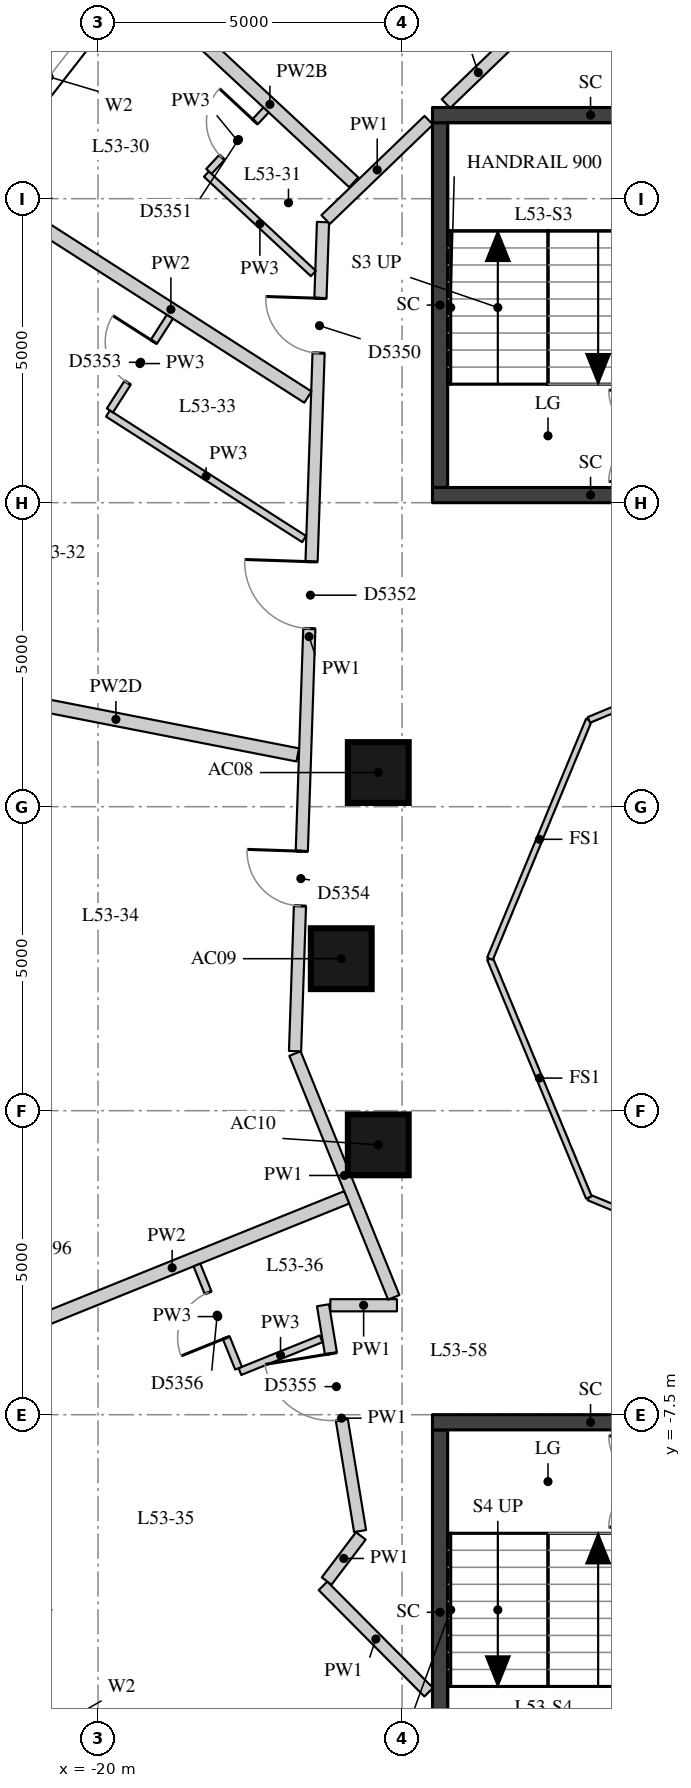
"""IFC4 building model, lengths in metres.
Left out: names, types, materials, properties, quantities, classifications, styles, units other than length and angle.
Written with IfcOpenShell. Run it as: python <this file> out.ifc"""

import sys

from ifc_helpers import new_model, si_unit, direction, frame, frame_2d, origin, origin_2d, place, context, subcontext, project, spatial, rectangle, extrude, element, fill, save


model = new_model("IFC4")
c1 = context("Model", 3, precision=1e-05, world=origin(), true_north=direction((0.0, 1.0)))
c2 = subcontext(c1, "Body", "Model", "MODEL_VIEW")
j1 = project(units=[si_unit("LENGTHUNIT", "METRE"), si_unit("PLANEANGLEUNIT", "RADIAN")], contexts=[c1])
p1 = place(None, origin())
s1 = spatial("IfcSite", under=j1, at=p1, CompositionType="ELEMENT")
p2 = place(p1, origin())
s2 = spatial("IfcBuilding", under=s1, at=p2, CompositionType="ELEMENT")
p3 = place(p2, frame((0.0, 0.0, 189.2)))
s3 = spatial("IfcBuildingStorey", under=s2, at=p3, CompositionType="ELEMENT", Elevation=189.2)
for number, where, z_axis, x_axis in (
    (1, (-15.391, 3.062, 0.0), (0.0, 0.0, 1.0), (1.0, 0.0, 0.0)),
    (2, (-16.0, 0.0, 0.0), (0.0, 0.0, 1.0), (1.0, 0.0, 0.0)),
    (3, (-15.391, -3.062, 0.0), (0.0, 0.0, 1.0), (1.0, 0.0, 0.0)),
):
    element("IfcColumn", number, at=place(p3, frame(where, z_axis=z_axis, x_axis=x_axis)), inside=s3, PredefinedType="COLUMN", context=c2, shape_type="SweptSolid", body=[
        extrude(rectangle(XDim=1.0, YDim=1.0, at=origin_2d()), origin(), (0.0, 0.0, 1.0), 3.3),
    ])
p4 = place(p3, frame((-19.751, 15.861, 0.0), z_axis=(0.0, 0.0, 1.0), x_axis=(-0.614220816451, -0.789134201919, 0.0)))
e4 = element("IfcWall", 4, at=p4, inside=s3, PredefinedType="SOLIDWALL", context=c2, shape_type="SweptSolid", body=[
    extrude(rectangle(XDim=3.438, YDim=0.45, at=frame_2d((1.719, 0.0))), origin(), (0.0, 0.0, 1.0), 3.02),
])
p5 = place(p4, frame((0.719, 0.0, 0.4)))
e5 = element("IfcOpeningElement", 5, at=p5, cuts=e4, PredefinedType="OPENING", context=c2, shape_type="SweptSolid", body=[
    extrude(rectangle(XDim=2.0, YDim=1.75, at=frame_2d((1.0, 0.875))), frame((0.0, 0.235, 0.0), z_axis=(0.0, -1.0, 0.0), x_axis=(1.0, 0.0, 0.0)), (0.0, 0.0, 1.0), 0.47),
])
p6 = place(p3, frame((-21.863, -11.348, 0.0), z_axis=(0.0, 0.0, 1.0), x_axis=(0.614255239631, -0.789107407509, 0.0)))
e6 = element("IfcWall", 6, at=p6, inside=s3, PredefinedType="SOLIDWALL", context=c2, shape_type="SweptSolid", body=[
    extrude(rectangle(XDim=3.438, YDim=0.45, at=frame_2d((1.719, 0.0))), origin(), (0.0, 0.0, 1.0), 3.02),
])
p7 = place(p6, frame((0.719, 0.0, 0.4)))
e7 = element("IfcOpeningElement", 7, at=p7, cuts=e6, PredefinedType="OPENING", context=c2, shape_type="SweptSolid", body=[
    extrude(rectangle(XDim=2.0, YDim=1.75, at=frame_2d((1.0, 0.875))), frame((0.0, 0.235, 0.0), z_axis=(0.0, -1.0, 0.0), x_axis=(1.0, 0.0, 0.0)), (0.0, 0.0, 1.0), 0.47),
])
p8 = place(p3, frame((-14.375, 7.75, -0.28), z_axis=(0.0, 0.0, 1.0), x_axis=(0.0, 1.0, 0.0)))
e8 = element("IfcWall", 8, at=p8, inside=s3, PredefinedType="SHEAR", context=c2, shape_type="SweptSolid", body=[
    extrude(rectangle(XDim=6.0, YDim=0.25, at=frame_2d((3.0, 0.0))), origin(), (0.0, 0.0, 1.0), 3.3),
])
for number, where, z_axis, x_axis in (
    (9, (-14.5, 13.875, -0.28), (0.0, 0.0, 1.0), (1.0, 0.0, 0.0)),
    (10, (-14.5, 7.625, -0.28), (0.0, 0.0, 1.0), (1.0, 0.0, 0.0)),
):
    element("IfcWall", number, at=place(p3, frame(where, z_axis=z_axis, x_axis=x_axis)), inside=s3, PredefinedType="SHEAR", context=c2, shape_type="SweptSolid", body=[
        extrude(rectangle(XDim=5.2, YDim=0.25, at=frame_2d((2.6, 0.0))), origin(), (0.0, 0.0, 1.0), 3.3),
    ])
p9 = place(p3, frame((-14.375, -13.75, -0.28), z_axis=(0.0, 0.0, 1.0), x_axis=(0.0, 1.0, 0.0)))
e11 = element("IfcWall", 11, at=p9, inside=s3, PredefinedType="SHEAR", context=c2, shape_type="SweptSolid", body=[
    extrude(rectangle(XDim=6.0, YDim=0.25, at=frame_2d((3.0, 0.0))), origin(), (0.0, 0.0, 1.0), 3.3),
])
p10 = place(p3, frame((-14.5, -7.625, -0.28), z_axis=(0.0, 0.0, 1.0), x_axis=(1.0, 0.0, 0.0)))
e12 = element("IfcWall", 12, at=p10, inside=s3, PredefinedType="SHEAR", context=c2, shape_type="SweptSolid", body=[
    extrude(rectangle(XDim=5.2, YDim=0.25, at=frame_2d((2.6, 0.0))), origin(), (0.0, 0.0, 1.0), 3.3),
])
p11 = place(p3, frame((-14.562, -12.064, 0.0), z_axis=(0.0, 0.0, 1.0), x_axis=(-0.704826289083, 0.709379942074, 0.0)))
e13 = element("IfcWall", 13, at=p11, inside=s3, PredefinedType="PARTITIONING", context=c2, shape_type="SweptSolid", body=[
    extrude(rectangle(XDim=2.466, YDim=0.2, at=frame_2d((1.233, 0.0))), origin(), (0.0, 0.0, 1.0), 3.02),
])
p12 = place(p3, frame((-16.24, -10.236, 0.0), z_axis=(0.0, 0.0, 1.0), x_axis=(0.60389301212, 0.797065386222, 0.0)))
e14 = element("IfcWall", 14, at=p12, inside=s3, PredefinedType="PARTITIONING", context=c2, shape_type="SweptSolid", body=[
    extrude(rectangle(XDim=0.931, YDim=0.2, at=frame_2d((0.466, 0.0))), origin(), (0.0, 0.0, 1.0), 3.02),
])
p13 = place(p3, frame((-15.69, -9.414, 0.0), z_axis=(0.0, 0.0, 1.0), x_axis=(-0.161968669214, 0.986795900981, 0.0)))
e15 = element("IfcWall", 15, at=p13, inside=s3, PredefinedType="PARTITIONING", context=c2, shape_type="SweptSolid", body=[
    extrude(rectangle(XDim=3.764, YDim=0.2, at=frame_2d((1.882, 0.0))), origin(), (0.0, 0.0, 1.0), 3.02),
])
p14 = place(p13, frame((1.858, 0.0, 0.0)))
e16 = element("IfcOpeningElement", 16, at=p14, cuts=e15, PredefinedType="OPENING", context=c2, shape_type="SweptSolid", body=[
    extrude(rectangle(XDim=1.1, YDim=2.1, at=frame_2d((0.55, 1.05))), frame((0.0, 0.11, 0.0), z_axis=(0.0, -1.0, 0.0), x_axis=(1.0, 0.0, 0.0)), (0.0, 0.0, 1.0), 0.22),
])
p15 = place(p3, frame((-16.18, -5.7, 0.0), z_axis=(0.0, 0.0, 1.0), x_axis=(1.0, 0.0, 0.0)))
e17 = element("IfcWall", 17, at=p15, inside=s3, PredefinedType="PARTITIONING", context=c2, shape_type="SweptSolid", body=[
    extrude(rectangle(XDim=1.096, YDim=0.2, at=frame_2d((0.548, 0.0))), origin(), (0.0, 0.0, 1.0), 3.02),
])
p16 = place(p3, frame((-15.137, -5.57, 0.0), z_axis=(0.0, 0.0, 1.0), x_axis=(-0.375464059939, 0.926836954213, 0.0)))
e18 = element("IfcWall", 18, at=p16, inside=s3, PredefinedType="PARTITIONING", context=c2, shape_type="SweptSolid", body=[
    extrude(rectangle(XDim=4.326, YDim=0.2, at=frame_2d((2.163, 0.0))), origin(), (0.0, 0.0, 1.0), 3.02),
])
p17 = place(p3, frame((-16.76, -1.521, 0.0), z_axis=(0.0, 0.0, 1.0), x_axis=(0.033695560079, 0.999432143385, 0.0)))
e19 = element("IfcWall", 19, at=p17, inside=s3, PredefinedType="PARTITIONING", context=c2, shape_type="SweptSolid", body=[
    extrude(rectangle(XDim=13.643, YDim=0.2, at=frame_2d((6.822, 0.0))), origin(), (0.0, 0.0, 1.0), 3.02),
])
p18 = place(p17, frame((11.489, 0.0, 0.0)))
e20 = element("IfcOpeningElement", 20, at=p18, cuts=e19, PredefinedType="OPENING", context=c2, shape_type="SweptSolid", body=[
    extrude(rectangle(XDim=0.9, YDim=2.1, at=frame_2d((0.45, 1.05))), frame((0.0, 0.11, 0.0), z_axis=(0.0, -1.0, 0.0), x_axis=(1.0, 0.0, 0.0)), (0.0, 0.0, 1.0), 0.22),
])
p19 = place(p17, frame((6.954, 0.0, 0.0)))
e21 = element("IfcOpeningElement", 21, at=p19, cuts=e19, PredefinedType="OPENING", context=c2, shape_type="SweptSolid", body=[
    extrude(rectangle(XDim=1.1, YDim=2.1, at=frame_2d((0.55, 1.05))), frame((0.0, 0.11, 0.0), z_axis=(0.0, -1.0, 0.0), x_axis=(1.0, 0.0, 0.0)), (0.0, 0.0, 1.0), 0.22),
])
p20 = place(p17, frame((2.39, 0.0, 0.0)))
e22 = element("IfcOpeningElement", 22, at=p20, cuts=e19, PredefinedType="OPENING", context=c2, shape_type="SweptSolid", body=[
    extrude(rectangle(XDim=0.9, YDim=2.1, at=frame_2d((0.45, 1.05))), frame((0.0, 0.11, 0.0), z_axis=(0.0, -1.0, 0.0), x_axis=(1.0, 0.0, 0.0)), (0.0, 0.0, 1.0), 0.22),
])
p21 = place(p3, frame((-16.257, 12.157, 0.0), z_axis=(0.0, 0.0, 1.0), x_axis=(0.720356671174, 0.693603825174, 0.0)))
e23 = element("IfcWall", 23, at=p21, inside=s3, PredefinedType="PARTITIONING", context=c2, shape_type="SweptSolid", body=[
    extrude(rectangle(XDim=2.354, YDim=0.2, at=frame_2d((1.177, 0.0))), origin(), (0.0, 0.0, 1.0), 3.02),
])
p22 = place(p3, frame((-14.278, 14.062, 0.0), z_axis=(0.0, 0.0, 1.0), x_axis=(0.720213092954, 0.693752910435, 0.0)))
e24 = element("IfcWall", 24, at=p22, inside=s3, PredefinedType="PARTITIONING", context=c2, shape_type="SweptSolid", body=[
    extrude(rectangle(XDim=1.476, YDim=0.2, at=frame_2d((0.738, 0.0))), origin(), (0.0, 0.0, 1.0), 3.02),
])
p23 = place(p3, frame((-18.553, 15.334, 0.0), z_axis=(0.0, 0.0, 1.0), x_axis=(0.732303975018, -0.680977891105, 0.0)))
e25 = element("IfcWall", 25, at=p23, inside=s3, PredefinedType="PARTITIONING", context=c2, shape_type="SweptSolid", body=[
    extrude(rectangle(XDim=3.767, YDim=0.22, at=frame_2d((1.884, 0.0))), origin(), (0.0, 0.0, 1.0), 2.57),
])
p24 = place(p3, frame((-21.055, 12.121, 0.0), z_axis=(0.0, 0.0, 1.0), x_axis=(0.842281345898, -0.539038156675, 0.0)))
e26 = element("IfcWall", 26, at=p24, inside=s3, PredefinedType="PARTITIONING", context=c2, shape_type="SweptSolid", body=[
    extrude(rectangle(XDim=5.35, YDim=0.22, at=frame_2d((2.675, 0.0))), origin(), (0.0, 0.0, 1.0), 3.02),
])
p25 = place(p3, frame((-22.697, 4.521, 0.0), z_axis=(0.0, 0.0, 1.0), x_axis=(0.981441525081, -0.19176165635, 0.0)))
e27 = element("IfcWall", 27, at=p25, inside=s3, PredefinedType="PARTITIONING", context=c2, shape_type="SweptSolid", body=[
    extrude(rectangle(XDim=6.094, YDim=0.22, at=frame_2d((3.047, 0.0))), origin(), (0.0, 0.0, 1.0), 2.47),
])
p26 = place(p3, frame((-21.651, -6.241, 0.0), z_axis=(0.0, 0.0, 1.0), x_axis=(0.927381885483, 0.374116076208, 0.0)))
e28 = element("IfcWall", 28, at=p26, inside=s3, PredefinedType="PARTITIONING", context=c2, shape_type="SweptSolid", body=[
    extrude(rectangle(XDim=6.19, YDim=0.22, at=frame_2d((3.095, 0.0))), origin(), (0.0, 0.0, 1.0), 3.02),
])
p27 = place(p3, frame((-16.459, 11.27, 0.0), z_axis=(0.0, 0.0, 1.0), x_axis=(-0.732311710068, 0.68096957296, 0.0)))
e29 = element("IfcWall", 29, at=p27, inside=s3, PredefinedType="PARTITIONING", context=c2, shape_type="SweptSolid", body=[
    extrude(rectangle(XDim=2.401, YDim=0.12, at=frame_2d((1.201, 0.0))), origin(), (0.0, 0.0, 1.0), 3.02),
])
p28 = place(p3, frame((-16.61, 6.902, 0.0), z_axis=(0.0, 0.0, 1.0), x_axis=(-0.842288763401, 0.539026566181, 0.0)))
e30 = element("IfcWall", 30, at=p28, inside=s3, PredefinedType="PARTITIONING", context=c2, shape_type="SweptSolid", body=[
    extrude(rectangle(XDim=3.83, YDim=0.12, at=frame_2d((1.915, 0.0))), origin(), (0.0, 0.0, 1.0), 3.02),
])
p29 = place(p3, frame((-16.331, -6.252, 0.0), z_axis=(0.0, 0.0, 1.0), x_axis=(-0.927409233125, -0.374048278053, 0.0)))
e31 = element("IfcWall", 31, at=p29, inside=s3, PredefinedType="PARTITIONING", context=c2, shape_type="SweptSolid", body=[
    extrude(rectangle(XDim=1.44, YDim=0.12, at=frame_2d((0.72, 0.0))), origin(), (0.0, 0.0, 1.0), 3.02),
])
p30 = place(p3, frame((-18.177, 12.949, 0.0), z_axis=(0.0, 0.0, 1.0), x_axis=(0.681081886823, 0.732207254431, 0.0)))
e32 = element("IfcWall", 32, at=p30, inside=s3, PredefinedType="PARTITIONING", context=c2, shape_type="SweptSolid", body=[
    extrude(rectangle(XDim=1.38, YDim=0.12, at=frame_2d((0.69, 0.0))), origin(), (0.0, 0.0, 1.0), 3.02),
])
p31 = place(p30, frame((0.315, 0.0, 0.0)))
e33 = element("IfcOpeningElement", 33, at=p31, cuts=e32, PredefinedType="OPENING", context=c2, shape_type="SweptSolid", body=[
    extrude(rectangle(XDim=0.8, YDim=2.1, at=frame_2d((0.4, 1.05))), frame((0.0, 0.07, 0.0), z_axis=(0.0, -1.0, 0.0), x_axis=(1.0, 0.0, 0.0)), (0.0, 0.0, 1.0), 0.14),
])
p32 = place(p3, frame((-19.804, 9.017, 0.0), z_axis=(0.0, 0.0, 1.0), x_axis=(0.538962837458, 0.842329543492, 0.0)))
e34 = element("IfcWall", 34, at=p32, inside=s3, PredefinedType="PARTITIONING", context=c2, shape_type="SweptSolid", body=[
    extrude(rectangle(XDim=1.83, YDim=0.12, at=frame_2d((0.915, 0.0))), origin(), (0.0, 0.0, 1.0), 3.02),
])
p33 = place(p32, frame((0.54, 0.0, 0.0)))
e35 = element("IfcOpeningElement", 35, at=p33, cuts=e34, PredefinedType="OPENING", context=c2, shape_type="SweptSolid", body=[
    extrude(rectangle(XDim=0.8, YDim=2.1, at=frame_2d((0.4, 1.05))), frame((0.0, 0.07, 0.0), z_axis=(0.0, -1.0, 0.0), x_axis=(1.0, 0.0, 0.0)), (0.0, 0.0, 1.0), 0.14),
])
p34 = place(p3, frame((-17.689, -6.735, 0.0), z_axis=(0.0, 0.0, 1.0), x_axis=(-0.374057168462, 0.927405647342, 0.0)))
e36 = element("IfcWall", 36, at=p34, inside=s3, PredefinedType="PARTITIONING", context=c2, shape_type="SweptSolid", body=[
    extrude(rectangle(XDim=1.83, YDim=0.12, at=frame_2d((0.915, 0.0))), origin(), (0.0, 0.0, 1.0), 3.02),
])
p35 = place(p34, frame((0.54, 0.0, 0.0)))
e37 = element("IfcOpeningElement", 37, at=p35, cuts=e36, PredefinedType="OPENING", context=c2, shape_type="SweptSolid", body=[
    extrude(rectangle(XDim=0.8, YDim=2.1, at=frame_2d((0.4, 1.05))), frame((0.0, 0.07, 0.0), z_axis=(0.0, -1.0, 0.0), x_axis=(1.0, 0.0, 0.0)), (0.0, 0.0, 1.0), 0.14),
])
for number, where, z_axis, x_axis in (
    (38, (-8.0, -5.554, 0.0), (0.0, 0.0, 1.0), (-0.924, 0.383, 0.0)),
    (39, (-11.927, -3.927, 0.0), (0.0, 0.0, 1.0), (-0.383, 0.924, 0.0)),
    (40, (-13.554, 0.0, 0.0), (0.0, 0.0, 1.0), (0.383, 0.924, 0.0)),
    (41, (-11.927, 3.927, 0.0), (0.0, 0.0, 1.0), (0.924, 0.383, 0.0)),
):
    element("IfcWall", number, at=place(p3, frame(where, z_axis=z_axis, x_axis=x_axis)), inside=s3, PredefinedType="PARTITIONING", context=c2, shape_type="SweptSolid", body=[
        extrude(rectangle(XDim=4.251, YDim=0.1, at=frame_2d((2.125, 0.0))), origin(), (0.0, 0.0, 1.0), 3.02),
    ])
p36 = place(p5, origin())
e42 = element("IfcWindow", 42, at=p36, inside=s3, PartitioningType="SINGLE_PANEL", PredefinedType="WINDOW", context=c2, shape_type="SweptSolid", body=[
    extrude(rectangle(XDim=2.0, YDim=1.75, at=frame_2d((1.0, 0.875))), frame((0.0, 0.035, 0.0), z_axis=(0.0, -1.0, 0.0), x_axis=(1.0, 0.0, 0.0)), (0.0, 0.0, 1.0), 0.06),
])
fill(e5, e42)
p37 = place(p7, origin())
e43 = element("IfcWindow", 43, at=p37, inside=s3, PartitioningType="SINGLE_PANEL", PredefinedType="WINDOW", context=c2, shape_type="SweptSolid", body=[
    extrude(rectangle(XDim=2.0, YDim=1.75, at=frame_2d((1.0, 0.875))), frame((0.0, 0.035, 0.0), z_axis=(0.0, -1.0, 0.0), x_axis=(1.0, 0.0, 0.0)), (0.0, 0.0, 1.0), 0.06),
])
fill(e7, e43)
p38 = place(p18, origin())
e44 = element("IfcDoor", 44, at=p38, inside=s3, OperationType="SINGLE_SWING_RIGHT", PredefinedType="DOOR", context=c2, shape_type="SweptSolid", body=[
    extrude(rectangle(XDim=0.9, YDim=2.1, at=frame_2d((0.45, 1.05))), frame((0.0, 0.025, 0.0), z_axis=(0.0, -1.0, 0.0), x_axis=(1.0, 0.0, 0.0)), (0.0, 0.0, 1.0), 0.05),
])
fill(e20, e44)
p39 = place(p31, origin())
e45 = element("IfcDoor", 45, at=p39, inside=s3, OperationType="SINGLE_SWING_RIGHT", PredefinedType="DOOR", context=c2, shape_type="SweptSolid", body=[
    extrude(rectangle(XDim=0.8, YDim=2.1, at=frame_2d((0.4, 1.05))), frame((0.0, 0.025, 0.0), z_axis=(0.0, -1.0, 0.0), x_axis=(1.0, 0.0, 0.0)), (0.0, 0.0, 1.0), 0.05),
])
fill(e33, e45)
p40 = place(p19, origin())
e46 = element("IfcDoor", 46, at=p40, inside=s3, OperationType="SINGLE_SWING_RIGHT", PredefinedType="DOOR", context=c2, shape_type="SweptSolid", body=[
    extrude(rectangle(XDim=1.1, YDim=2.1, at=frame_2d((0.55, 1.05))), frame((0.0, 0.025, 0.0), z_axis=(0.0, -1.0, 0.0), x_axis=(1.0, 0.0, 0.0)), (0.0, 0.0, 1.0), 0.05),
])
fill(e21, e46)
p41 = place(p33, origin())
e47 = element("IfcDoor", 47, at=p41, inside=s3, OperationType="SINGLE_SWING_RIGHT", PredefinedType="DOOR", context=c2, shape_type="SweptSolid", body=[
    extrude(rectangle(XDim=0.8, YDim=2.1, at=frame_2d((0.4, 1.05))), frame((0.0, 0.025, 0.0), z_axis=(0.0, -1.0, 0.0), x_axis=(1.0, 0.0, 0.0)), (0.0, 0.0, 1.0), 0.05),
])
fill(e35, e47)
p42 = place(p20, origin())
e48 = element("IfcDoor", 48, at=p42, inside=s3, OperationType="SINGLE_SWING_RIGHT", PredefinedType="DOOR", context=c2, shape_type="SweptSolid", body=[
    extrude(rectangle(XDim=0.9, YDim=2.1, at=frame_2d((0.45, 1.05))), frame((0.0, 0.025, 0.0), z_axis=(0.0, -1.0, 0.0), x_axis=(1.0, 0.0, 0.0)), (0.0, 0.0, 1.0), 0.05),
])
fill(e22, e48)
p43 = place(p14, origin())
e49 = element("IfcDoor", 49, at=p43, inside=s3, OperationType="SINGLE_SWING_RIGHT", PredefinedType="DOOR", context=c2, shape_type="SweptSolid", body=[
    extrude(rectangle(XDim=1.1, YDim=2.1, at=frame_2d((0.55, 1.05))), frame((0.0, 0.025, 0.0), z_axis=(0.0, -1.0, 0.0), x_axis=(1.0, 0.0, 0.0)), (0.0, 0.0, 1.0), 0.05),
])
fill(e16, e49)
p44 = place(p35, origin())
e50 = element("IfcDoor", 50, at=p44, inside=s3, OperationType="SINGLE_SWING_LEFT", PredefinedType="DOOR", context=c2, shape_type="SweptSolid", body=[
    extrude(rectangle(XDim=0.8, YDim=2.1, at=frame_2d((0.4, 1.05))), frame((0.0, 0.025, 0.0), z_axis=(0.0, -1.0, 0.0), x_axis=(1.0, 0.0, 0.0)), (0.0, 0.0, 1.0), 0.05),
])
fill(e37, e50)
save(model, sys.argv[1])
